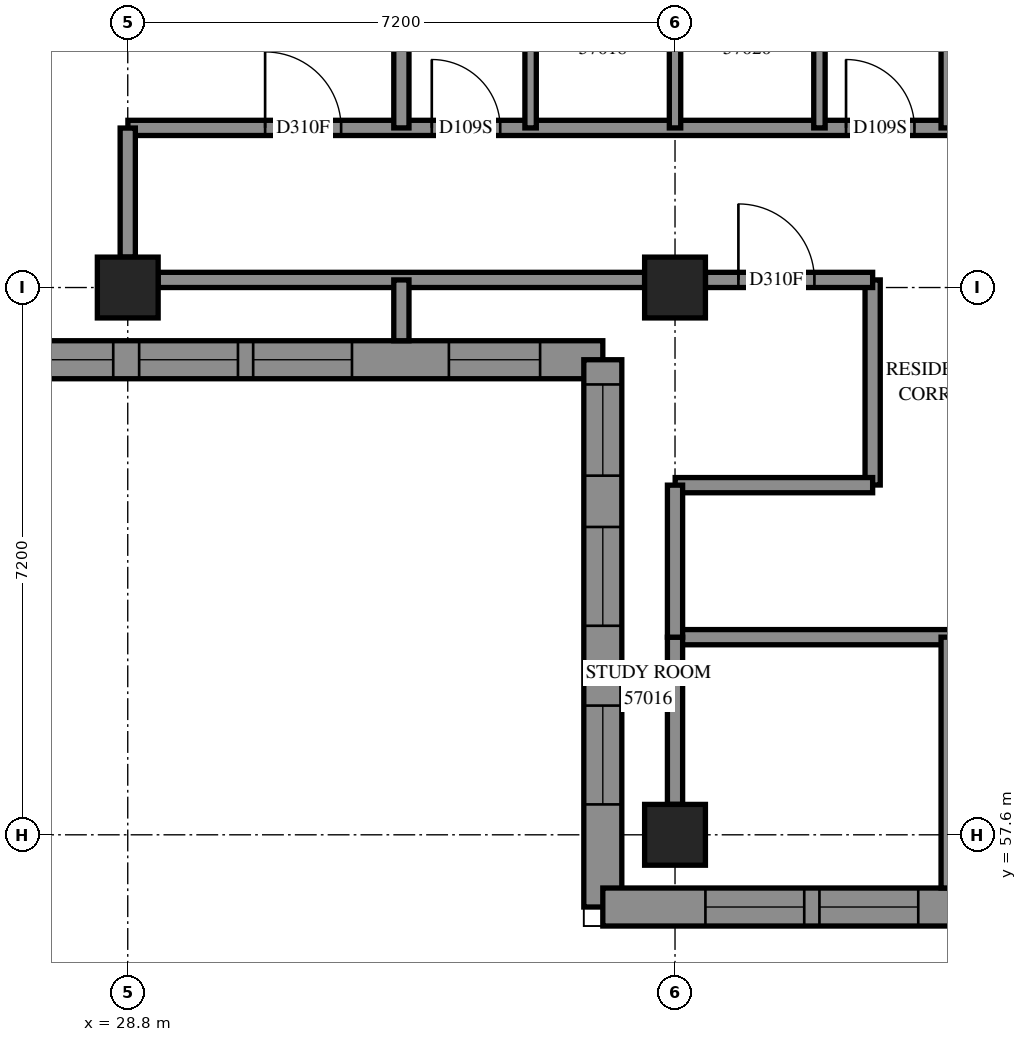
"""IFC4 building model, lengths in metres.
Left out: names, types, materials, properties, quantities, classifications, styles, units other than length and angle.
Written with IfcOpenShell. Run it as: python <this file> out.ifc"""

import sys

from ifc_helpers import new_model, si_unit, direction, frame, frame_2d, origin, origin_2d, place, context, subcontext, project, spatial, polyline, rectangle, outline, extrude, element, fill, save


model = new_model("IFC4")
c1 = context("Model", 3, precision=1e-05, world=origin(), true_north=direction((0.0, 1.0)))
c2 = subcontext(c1, "Body", "Model", "MODEL_VIEW")
j1 = project(units=[si_unit("LENGTHUNIT", "METRE"), si_unit("PLANEANGLEUNIT", "RADIAN")], contexts=[c1])
p1 = place(None, origin())
s1 = spatial("IfcSite", under=j1, at=p1, CompositionType="ELEMENT")
p2 = place(p1, origin())
s2 = spatial("IfcBuilding", under=s1, at=p2, CompositionType="ELEMENT")
p3 = place(p2, frame((0.0, 0.0, 210.0)))
s3 = spatial("IfcBuildingStorey", under=s2, at=p3, CompositionType="ELEMENT", Elevation=210.0)
for number, where, z_axis, x_axis in (
    (1, (28.8, 64.8, 0.0), (0.0, 0.0, 1.0), (1.0, 0.0, 0.0)),
    (2, (36.0, 57.6, 0.0), (0.0, 0.0, 1.0), (1.0, 0.0, 0.0)),
    (3, (36.0, 64.8, 0.0), (0.0, 0.0, 1.0), (1.0, 0.0, 0.0)),
):
    element("IfcColumn", number, at=place(p3, frame(where, z_axis=z_axis, x_axis=x_axis)), inside=s3, PredefinedType="COLUMN", context=c2, shape_type="SweptSolid", body=[
        extrude(rectangle(XDim=0.8, YDim=0.8, at=origin_2d()), origin(), (0.0, 0.0, 1.0), 3.1),
    ])
p4 = place(p3, frame((26.768, 63.85, 0.0), z_axis=(0.0, 0.0, 1.0), x_axis=(1.0, 0.0, 0.0)))
e4 = element("IfcWall", 4, at=p4, inside=s3, PredefinedType="SOLIDWALL", context=c2, shape_type="SweptSolid", body=[
    extrude(outline(polyline([(-0.25, -0.25), (8.032, -0.25), (8.532, 0.25), (0.25, 0.25), (-0.25, -0.25)])), origin(), (0.0, 0.0, 1.0), 3.1),
])
p5 = place(p4, frame((2.182, 0.0, 0.45)))
e5 = element("IfcOpeningElement", 5, at=p5, cuts=e4, PredefinedType="OPENING", context=c2, shape_type="SweptSolid", body=[
    extrude(rectangle(XDim=1.3, YDim=2.5, at=frame_2d((0.65, 1.25))), frame((0.0, 0.26, 0.0), z_axis=(0.0, -1.0, 0.0), x_axis=(1.0, 0.0, 0.0)), (0.0, 0.0, 1.0), 0.52),
])
p6 = place(p4, frame((3.682, 0.0, 0.45)))
e6 = element("IfcOpeningElement", 6, at=p6, cuts=e4, PredefinedType="OPENING", context=c2, shape_type="SweptSolid", body=[
    extrude(rectangle(XDim=1.3, YDim=2.5, at=frame_2d((0.65, 1.25))), frame((0.0, 0.26, 0.0), z_axis=(0.0, -1.0, 0.0), x_axis=(1.0, 0.0, 0.0)), (0.0, 0.0, 1.0), 0.52),
])
p7 = place(p4, frame((0.641, 0.0, 0.45)))
e7 = element("IfcOpeningElement", 7, at=p7, cuts=e4, PredefinedType="OPENING", context=c2, shape_type="SweptSolid", body=[
    extrude(rectangle(XDim=1.2, YDim=2.5, at=frame_2d((0.6, 1.25))), frame((0.0, 0.26, 0.0), z_axis=(0.0, -1.0, 0.0), x_axis=(1.0, 0.0, 0.0)), (0.0, 0.0, 1.0), 0.52),
])
p8 = place(p4, frame((6.257, 0.0, 0.45)))
e8 = element("IfcOpeningElement", 8, at=p8, cuts=e4, PredefinedType="OPENING", context=c2, shape_type="SweptSolid", body=[
    extrude(rectangle(XDim=1.2, YDim=2.5, at=frame_2d((0.6, 1.25))), frame((0.0, 0.26, 0.0), z_axis=(0.0, -1.0, 0.0), x_axis=(1.0, 0.0, 0.0)), (0.0, 0.0, 1.0), 0.52),
])
p9 = place(p3, frame((35.05, 63.85, 0.0), z_axis=(0.0, 0.0, 1.0), x_axis=(0.0, -1.0, 0.0)))
e9 = element("IfcWall", 9, at=p9, inside=s3, PredefinedType="SOLIDWALL", context=c2, shape_type="SweptSolid", body=[
    extrude(outline(polyline([(0.25, -0.25), (7.45, -0.25), (6.95, 0.25), (-0.25, 0.25), (0.25, -0.25)])), origin(), (0.0, 0.0, 1.0), 3.1),
])
p10 = place(p9, frame((2.2, 0.0, 0.45)))
e10 = element("IfcOpeningElement", 10, at=p10, cuts=e9, PredefinedType="OPENING", context=c2, shape_type="SweptSolid", body=[
    extrude(rectangle(XDim=1.3, YDim=2.5, at=frame_2d((0.65, 1.25))), frame((0.0, 0.26, 0.0), z_axis=(0.0, -1.0, 0.0), x_axis=(1.0, 0.0, 0.0)), (0.0, 0.0, 1.0), 0.52),
])
p11 = place(p9, frame((4.55, 0.0, 0.45)))
e11 = element("IfcOpeningElement", 11, at=p11, cuts=e9, PredefinedType="OPENING", context=c2, shape_type="SweptSolid", body=[
    extrude(rectangle(XDim=1.3, YDim=2.5, at=frame_2d((0.65, 1.25))), frame((0.0, 0.26, 0.0), z_axis=(0.0, -1.0, 0.0), x_axis=(1.0, 0.0, 0.0)), (0.0, 0.0, 1.0), 0.52),
])
p12 = place(p9, frame((0.325, 0.0, 0.45)))
e12 = element("IfcOpeningElement", 12, at=p12, cuts=e9, PredefinedType="OPENING", context=c2, shape_type="SweptSolid", body=[
    extrude(rectangle(XDim=1.2, YDim=2.5, at=frame_2d((0.6, 1.25))), frame((0.0, 0.26, 0.0), z_axis=(0.0, -1.0, 0.0), x_axis=(1.0, 0.0, 0.0)), (0.0, 0.0, 1.0), 0.52),
])
p13 = place(p3, frame((35.05, 56.65, 0.0), z_axis=(0.0, 0.0, 1.0), x_axis=(1.0, 0.0, 0.0)))
e13 = element("IfcWall", 13, at=p13, inside=s3, PredefinedType="SOLIDWALL", context=c2, shape_type="SweptSolid", body=[
    extrude(outline(polyline([(-0.25, -0.25), (6.95, -0.25), (7.45, 0.25), (0.25, 0.25), (-0.25, -0.25)])), origin(), (0.0, 0.0, 1.0), 3.1),
])
p14 = place(p13, frame((1.35, 0.0, 0.45)))
e14 = element("IfcOpeningElement", 14, at=p14, cuts=e13, PredefinedType="OPENING", context=c2, shape_type="SweptSolid", body=[
    extrude(rectangle(XDim=1.3, YDim=2.5, at=frame_2d((0.65, 1.25))), frame((0.0, 0.26, 0.0), z_axis=(0.0, -1.0, 0.0), x_axis=(1.0, 0.0, 0.0)), (0.0, 0.0, 1.0), 0.52),
])
p15 = place(p13, frame((2.85, 0.0, 0.45)))
e15 = element("IfcOpeningElement", 15, at=p15, cuts=e13, PredefinedType="OPENING", context=c2, shape_type="SweptSolid", body=[
    extrude(rectangle(XDim=1.3, YDim=2.5, at=frame_2d((0.65, 1.25))), frame((0.0, 0.26, 0.0), z_axis=(0.0, -1.0, 0.0), x_axis=(1.0, 0.0, 0.0)), (0.0, 0.0, 1.0), 0.52),
])
p16 = place(p13, frame((5.175, 0.0, 0.45)))
e16 = element("IfcOpeningElement", 16, at=p16, cuts=e13, PredefinedType="OPENING", context=c2, shape_type="SweptSolid", body=[
    extrude(rectangle(XDim=1.2, YDim=2.5, at=frame_2d((0.6, 1.25))), frame((0.0, 0.26, 0.0), z_axis=(0.0, -1.0, 0.0), x_axis=(1.0, 0.0, 0.0)), (0.0, 0.0, 1.0), 0.52),
])
p17 = place(p3, frame((36.0, 60.2, 0.0), z_axis=(0.0, 0.0, 1.0), x_axis=(1.0, 0.0, 0.0)))
e17 = element("IfcWall", 17, at=p17, inside=s3, PredefinedType="PARTITIONING", context=c2, shape_type="SweptSolid", body=[
    extrude(rectangle(XDim=17.0, YDim=0.2, at=frame_2d((8.5, 0.0))), origin(), (0.0, 0.0, 1.0), 3.1),
])
p18 = place(p17, frame((4.125, 0.0, 0.0)))
e18 = element("IfcOpeningElement", 18, at=p18, cuts=e17, PredefinedType="OPENING", context=c2, shape_type="SweptSolid", body=[
    extrude(rectangle(XDim=1.0, YDim=2.1, at=frame_2d((0.5, 1.05))), frame((0.0, 0.11, 0.0), z_axis=(0.0, -1.0, 0.0), x_axis=(1.0, 0.0, 0.0)), (0.0, 0.0, 1.0), 0.22),
])
p19 = place(p17, frame((7.6, 0.0, 0.0)))
e19 = element("IfcOpeningElement", 19, at=p19, cuts=e17, PredefinedType="OPENING", context=c2, shape_type="SweptSolid", body=[
    extrude(rectangle(XDim=0.9, YDim=2.1, at=frame_2d((0.45, 1.05))), frame((0.0, 0.11, 0.0), z_axis=(0.0, -1.0, 0.0), x_axis=(1.0, 0.0, 0.0)), (0.0, 0.0, 1.0), 0.22),
])
p20 = place(p17, frame((11.48, 0.0, 0.0)))
e20 = element("IfcOpeningElement", 20, at=p20, cuts=e17, PredefinedType="OPENING", context=c2, shape_type="SweptSolid", body=[
    extrude(rectangle(XDim=1.0, YDim=2.1, at=frame_2d((0.5, 1.05))), frame((0.0, 0.11, 0.0), z_axis=(0.0, -1.0, 0.0), x_axis=(1.0, 0.0, 0.0)), (0.0, 0.0, 1.0), 0.22),
])
p21 = place(p17, frame((15.805, 0.0, 0.0)))
e21 = element("IfcOpeningElement", 21, at=p21, cuts=e17, PredefinedType="OPENING", context=c2, shape_type="SweptSolid", body=[
    extrude(rectangle(XDim=1.0, YDim=2.1, at=frame_2d((0.5, 1.05))), frame((0.0, 0.11, 0.0), z_axis=(0.0, -1.0, 0.0), x_axis=(1.0, 0.0, 0.0)), (0.0, 0.0, 1.0), 0.22),
])
p22 = place(p3, frame((28.802, 66.9, 0.0), z_axis=(0.0, 0.0, 1.0), x_axis=(1.0, 0.0, 0.0)))
e22 = element("IfcWall", 22, at=p22, inside=s3, PredefinedType="PARTITIONING", context=c2, shape_type="SweptSolid", body=[
    extrude(rectangle(XDim=11.798, YDim=0.2, at=frame_2d((5.899, 0.0))), origin(), (0.0, 0.0, 1.0), 3.1),
])
p23 = place(p22, frame((1.805, 0.0, 0.0)))
e23 = element("IfcOpeningElement", 23, at=p23, cuts=e22, PredefinedType="OPENING", context=c2, shape_type="SweptSolid", body=[
    extrude(rectangle(XDim=1.0, YDim=2.1, at=frame_2d((0.5, 1.05))), frame((0.0, 0.11, 0.0), z_axis=(0.0, -1.0, 0.0), x_axis=(1.0, 0.0, 0.0)), (0.0, 0.0, 1.0), 0.22),
])
p24 = place(p22, frame((3.998, 0.0, 0.0)))
e24 = element("IfcOpeningElement", 24, at=p24, cuts=e22, PredefinedType="OPENING", context=c2, shape_type="SweptSolid", body=[
    extrude(rectangle(XDim=0.9, YDim=2.1, at=frame_2d((0.45, 1.05))), frame((0.0, 0.11, 0.0), z_axis=(0.0, -1.0, 0.0), x_axis=(1.0, 0.0, 0.0)), (0.0, 0.0, 1.0), 0.22),
])
p25 = place(p22, frame((9.448, 0.0, 0.0)))
e25 = element("IfcOpeningElement", 25, at=p25, cuts=e22, PredefinedType="OPENING", context=c2, shape_type="SweptSolid", body=[
    extrude(rectangle(XDim=0.9, YDim=2.1, at=frame_2d((0.45, 1.05))), frame((0.0, 0.11, 0.0), z_axis=(0.0, -1.0, 0.0), x_axis=(1.0, 0.0, 0.0)), (0.0, 0.0, 1.0), 0.22),
])
p26 = place(p3, frame((29.2, 64.9, 0.0), z_axis=(0.0, 0.0, 1.0), x_axis=(1.0, 0.0, 0.0)))
e26 = element("IfcWall", 26, at=p26, inside=s3, PredefinedType="PARTITIONING", context=c2, shape_type="SweptSolid", body=[
    extrude(rectangle(XDim=6.4, YDim=0.2, at=frame_2d((3.2, 0.0))), origin(), (0.0, 0.0, 1.0), 2.6),
])
p27 = place(p3, frame((32.4, 66.9, 0.0), z_axis=(0.0, 0.0, 1.0), x_axis=(0.0, 1.0, 0.0)))
e27 = element("IfcWall", 27, at=p27, inside=s3, PredefinedType="PARTITIONING", context=c2, shape_type="SweptSolid", body=[
    extrude(rectangle(XDim=6.054, YDim=0.2, at=frame_2d((3.027, 0.0))), origin(), (0.0, 0.0, 1.0), 3.1),
])
p28 = place(p3, frame((39.6, 66.9, 0.0), z_axis=(0.0, 0.0, 1.0), x_axis=(0.0, 1.0, 0.0)))
e28 = element("IfcWall", 28, at=p28, inside=s3, PredefinedType="PARTITIONING", context=c2, shape_type="SweptSolid", body=[
    extrude(rectangle(XDim=5.996, YDim=0.2, at=frame_2d((2.998, 0.0))), origin(), (0.0, 0.0, 1.0), 3.1),
])
p29 = place(p3, frame((39.6, 56.9, 0.0), z_axis=(0.0, 0.0, 1.0), x_axis=(0.0, 1.0, 0.0)))
e29 = element("IfcWall", 29, at=p29, inside=s3, PredefinedType="PARTITIONING", context=c2, shape_type="SweptSolid", body=[
    extrude(rectangle(XDim=3.3, YDim=0.2, at=frame_2d((1.65, 0.0))), origin(), (0.0, 0.0, 1.0), 3.1),
])
p30 = place(p3, frame((38.6, 62.202, 0.0), z_axis=(0.0, 0.0, 1.0), x_axis=(0.0, 1.0, 0.0)))
e30 = element("IfcWall", 30, at=p30, inside=s3, PredefinedType="PARTITIONING", context=c2, shape_type="SweptSolid", body=[
    extrude(rectangle(XDim=2.698, YDim=0.2, at=frame_2d((1.349, 0.0))), origin(), (0.0, 0.0, 1.0), 3.1),
])
p31 = place(p3, frame((36.002, 62.2, 0.0), z_axis=(0.0, 0.0, 1.0), x_axis=(1.0, 0.0, 0.0)))
e31 = element("IfcWall", 31, at=p31, inside=s3, PredefinedType="PARTITIONING", context=c2, shape_type="SweptSolid", body=[
    extrude(rectangle(XDim=2.598, YDim=0.2, at=frame_2d((1.299, 0.0))), origin(), (0.0, 0.0, 1.0), 3.1),
])
for number, where, z_axis, x_axis in (
    (32, (34.1, 66.9, 0.0), (0.0, 0.0, 1.0), (0.0, 1.0, 0.0)),
    (33, (36.0, 66.9, 0.0), (0.0, 0.0, 1.0), (0.0, 1.0, 0.0)),
    (34, (37.9, 66.9, 0.0), (0.0, 0.0, 1.0), (0.0, 1.0, 0.0)),
):
    element("IfcWall", number, at=place(p3, frame(where, z_axis=z_axis, x_axis=x_axis)), inside=s3, PredefinedType="PARTITIONING", context=c2, shape_type="SweptSolid", body=[
        extrude(rectangle(XDim=2.4, YDim=0.15, at=frame_2d((1.2, 0.0))), origin(), (0.0, 0.0, 1.0), 3.1),
    ])
p32 = place(p3, frame((36.4, 64.9, 0.0), z_axis=(0.0, 0.0, 1.0), x_axis=(1.0, 0.0, 0.0)))
e35 = element("IfcWall", 35, at=p32, inside=s3, PredefinedType="PARTITIONING", context=c2, shape_type="SweptSolid", body=[
    extrude(rectangle(XDim=2.2, YDim=0.2, at=frame_2d((1.1, 0.0))), origin(), (0.0, 0.0, 1.0), 3.1),
])
p33 = place(p32, frame((0.434, 0.0, 0.0)))
e36 = element("IfcOpeningElement", 36, at=p33, cuts=e35, PredefinedType="OPENING", context=c2, shape_type="SweptSolid", body=[
    extrude(rectangle(XDim=1.0, YDim=2.1, at=frame_2d((0.5, 1.05))), frame((0.0, 0.11, 0.0), z_axis=(0.0, -1.0, 0.0), x_axis=(1.0, 0.0, 0.0)), (0.0, 0.0, 1.0), 0.22),
])
p34 = place(p3, frame((36.0, 58.0, 0.0), z_axis=(0.0, 0.0, 1.0), x_axis=(0.0, 1.0, 0.0)))
e37 = element("IfcWall", 37, at=p34, inside=s3, PredefinedType="PARTITIONING", context=c2, shape_type="SweptSolid", body=[
    extrude(rectangle(XDim=2.2, YDim=0.2, at=frame_2d((1.1, 0.0))), origin(), (0.0, 0.0, 1.0), 2.6),
])
p35 = place(p3, frame((36.0, 60.2, 0.0), z_axis=(0.0, 0.0, 1.0), x_axis=(0.0, 1.0, 0.0)))
e38 = element("IfcWall", 38, at=p35, inside=s3, PredefinedType="PARTITIONING", context=c2, shape_type="SweptSolid", body=[
    extrude(rectangle(XDim=2.0, YDim=0.2, at=frame_2d((1.0, 0.0))), origin(), (0.0, 0.0, 1.0), 2.6),
])
p36 = place(p3, frame((28.8, 65.2, 0.0), z_axis=(0.0, 0.0, 1.0), x_axis=(0.0, 1.0, 0.0)))
e39 = element("IfcWall", 39, at=p36, inside=s3, PredefinedType="PARTITIONING", context=c2, shape_type="SweptSolid", body=[
    extrude(rectangle(XDim=1.698, YDim=0.2, at=frame_2d((0.849, 0.0))), origin(), (0.0, 0.0, 1.0), 2.6),
])
p37 = place(p3, frame((32.4, 64.1, 0.0), z_axis=(0.0, 0.0, 1.0), x_axis=(0.0, 1.0, 0.0)))
e40 = element("IfcWall", 40, at=p37, inside=s3, PredefinedType="PARTITIONING", context=c2, shape_type="SweptSolid", body=[
    extrude(rectangle(XDim=0.8, YDim=0.2, at=frame_2d((0.4, 0.0))), origin(), (0.0, 0.0, 1.0), 3.1),
])
p38 = place(p5, origin())
e41 = element("IfcWindow", 41, at=p38, inside=s3, PartitioningType="SINGLE_PANEL", PredefinedType="WINDOW", context=c2, shape_type="SweptSolid", body=[
    extrude(rectangle(XDim=1.3, YDim=2.5, at=frame_2d((0.65, 1.25))), frame((0.0, 0.18, 0.0), z_axis=(0.0, -1.0, 0.0), x_axis=(1.0, 0.0, 0.0)), (0.0, 0.0, 1.0), 0.06),
])
fill(e5, e41)
p39 = place(p6, origin())
e42 = element("IfcWindow", 42, at=p39, inside=s3, PartitioningType="SINGLE_PANEL", PredefinedType="WINDOW", context=c2, shape_type="SweptSolid", body=[
    extrude(rectangle(XDim=1.3, YDim=2.5, at=frame_2d((0.65, 1.25))), frame((0.0, 0.18, 0.0), z_axis=(0.0, -1.0, 0.0), x_axis=(1.0, 0.0, 0.0)), (0.0, 0.0, 1.0), 0.06),
])
fill(e6, e42)
p40 = place(p7, origin())
e43 = element("IfcWindow", 43, at=p40, inside=s3, PartitioningType="SINGLE_PANEL", PredefinedType="WINDOW", context=c2, shape_type="SweptSolid", body=[
    extrude(rectangle(XDim=1.2, YDim=2.5, at=frame_2d((0.6, 1.25))), frame((0.0, 0.18, 0.0), z_axis=(0.0, -1.0, 0.0), x_axis=(1.0, 0.0, 0.0)), (0.0, 0.0, 1.0), 0.06),
])
fill(e7, e43)
p41 = place(p8, origin())
e44 = element("IfcWindow", 44, at=p41, inside=s3, PartitioningType="SINGLE_PANEL", PredefinedType="WINDOW", context=c2, shape_type="SweptSolid", body=[
    extrude(rectangle(XDim=1.2, YDim=2.5, at=frame_2d((0.6, 1.25))), frame((0.0, 0.18, 0.0), z_axis=(0.0, -1.0, 0.0), x_axis=(1.0, 0.0, 0.0)), (0.0, 0.0, 1.0), 0.06),
])
fill(e8, e44)
p42 = place(p10, origin())
e45 = element("IfcWindow", 45, at=p42, inside=s3, PartitioningType="SINGLE_PANEL", PredefinedType="WINDOW", context=c2, shape_type="SweptSolid", body=[
    extrude(rectangle(XDim=1.3, YDim=2.5, at=frame_2d((0.65, 1.25))), frame((0.0, 0.18, 0.0), z_axis=(0.0, -1.0, 0.0), x_axis=(1.0, 0.0, 0.0)), (0.0, 0.0, 1.0), 0.06),
])
fill(e10, e45)
p43 = place(p11, origin())
e46 = element("IfcWindow", 46, at=p43, inside=s3, PartitioningType="SINGLE_PANEL", PredefinedType="WINDOW", context=c2, shape_type="SweptSolid", body=[
    extrude(rectangle(XDim=1.3, YDim=2.5, at=frame_2d((0.65, 1.25))), frame((0.0, 0.18, 0.0), z_axis=(0.0, -1.0, 0.0), x_axis=(1.0, 0.0, 0.0)), (0.0, 0.0, 1.0), 0.06),
])
fill(e11, e46)
p44 = place(p12, origin())
e47 = element("IfcWindow", 47, at=p44, inside=s3, PartitioningType="SINGLE_PANEL", PredefinedType="WINDOW", context=c2, shape_type="SweptSolid", body=[
    extrude(rectangle(XDim=1.2, YDim=2.5, at=frame_2d((0.6, 1.25))), frame((0.0, 0.18, 0.0), z_axis=(0.0, -1.0, 0.0), x_axis=(1.0, 0.0, 0.0)), (0.0, 0.0, 1.0), 0.06),
])
fill(e12, e47)
p45 = place(p14, origin())
e48 = element("IfcWindow", 48, at=p45, inside=s3, PartitioningType="SINGLE_PANEL", PredefinedType="WINDOW", context=c2, shape_type="SweptSolid", body=[
    extrude(rectangle(XDim=1.3, YDim=2.5, at=frame_2d((0.65, 1.25))), frame((0.0, 0.18, 0.0), z_axis=(0.0, -1.0, 0.0), x_axis=(1.0, 0.0, 0.0)), (0.0, 0.0, 1.0), 0.06),
])
fill(e14, e48)
p46 = place(p15, origin())
e49 = element("IfcWindow", 49, at=p46, inside=s3, PartitioningType="SINGLE_PANEL", PredefinedType="WINDOW", context=c2, shape_type="SweptSolid", body=[
    extrude(rectangle(XDim=1.3, YDim=2.5, at=frame_2d((0.65, 1.25))), frame((0.0, 0.18, 0.0), z_axis=(0.0, -1.0, 0.0), x_axis=(1.0, 0.0, 0.0)), (0.0, 0.0, 1.0), 0.06),
])
fill(e15, e49)
p47 = place(p23, origin())
e50 = element("IfcDoor", 50, at=p47, inside=s3, OperationType="SINGLE_SWING_RIGHT", PredefinedType="DOOR", context=c2, shape_type="SweptSolid", body=[
    extrude(rectangle(XDim=1.0, YDim=2.1, at=frame_2d((0.5, 1.05))), frame((0.0, 0.025, 0.0), z_axis=(0.0, -1.0, 0.0), x_axis=(1.0, 0.0, 0.0)), (0.0, 0.0, 1.0), 0.05),
])
fill(e23, e50)
p48 = place(p33, origin())
e51 = element("IfcDoor", 51, at=p48, inside=s3, OperationType="SINGLE_SWING_RIGHT", PredefinedType="DOOR", context=c2, shape_type="SweptSolid", body=[
    extrude(rectangle(XDim=1.0, YDim=2.1, at=frame_2d((0.5, 1.05))), frame((0.0, 0.025, 0.0), z_axis=(0.0, -1.0, 0.0), x_axis=(1.0, 0.0, 0.0)), (0.0, 0.0, 1.0), 0.05),
])
fill(e36, e51)
p49 = place(p24, origin())
e52 = element("IfcDoor", 52, at=p49, inside=s3, OperationType="SINGLE_SWING_LEFT", PredefinedType="DOOR", context=c2, shape_type="SweptSolid", body=[
    extrude(rectangle(XDim=0.9, YDim=2.1, at=frame_2d((0.45, 1.05))), frame((0.0, 0.025, 0.0), z_axis=(0.0, -1.0, 0.0), x_axis=(1.0, 0.0, 0.0)), (0.0, 0.0, 1.0), 0.05),
])
fill(e24, e52)
p50 = place(p25, origin())
e53 = element("IfcDoor", 53, at=p50, inside=s3, OperationType="SINGLE_SWING_RIGHT", PredefinedType="DOOR", context=c2, shape_type="SweptSolid", body=[
    extrude(rectangle(XDim=0.9, YDim=2.1, at=frame_2d((0.45, 1.05))), frame((0.0, 0.025, 0.0), z_axis=(0.0, -1.0, 0.0), x_axis=(1.0, 0.0, 0.0)), (0.0, 0.0, 1.0), 0.05),
])
fill(e25, e53)
save(model, sys.argv[1])
